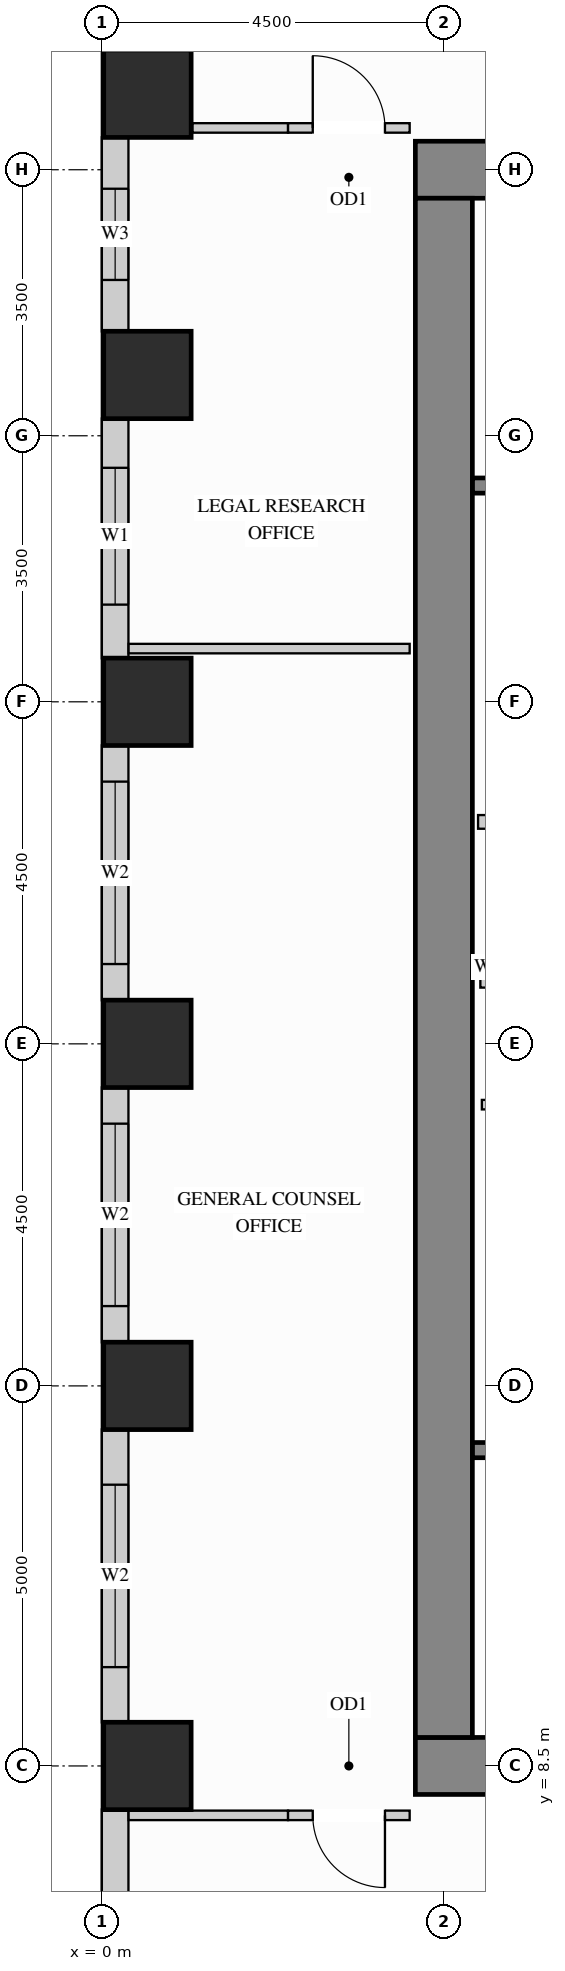
"""IFC4 building model, lengths in metres.
Left out: names, types, materials, properties, quantities, classifications, styles, units other than length and angle.
Written with IfcOpenShell. Run it as: python <this file> out.ifc"""

import sys

from ifc_helpers import new_model, si_unit, direction, frame, frame_2d, origin, origin_2d, place, context, subcontext, project, spatial, rectangle, extrude, source, transform, mapped, element, fill, save


model = new_model("IFC4")
c1 = context("Model", 3, precision=1e-05, world=origin(), true_north=direction((0.0, 1.0)))
c2 = subcontext(c1, "Body", "Model", "MODEL_VIEW")
j1 = project(units=[si_unit("LENGTHUNIT", "METRE"), si_unit("PLANEANGLEUNIT", "RADIAN")], contexts=[c1])
p1 = place(None, origin())
s1 = spatial("IfcSite", under=j1, at=p1, CompositionType="ELEMENT")
p2 = place(p1, origin())
s2 = spatial("IfcBuilding", under=s1, at=p2, CompositionType="ELEMENT")
p3 = place(p2, frame((0.0, 0.0, 88.2)))
s3 = spatial("IfcBuildingStorey", under=s2, at=p3, CompositionType="ELEMENT", Elevation=88.2)
m1 = source(origin(), c2, "Body", "SweptSolid", [
    extrude(rectangle(XDim=1.15, YDim=1.15, at=origin_2d()), origin(), (0.0, 0.0, 1.0), 3.38),
])
for number, where, z_axis, x_axis in (
    (1, (0.6, 13.5, 0.0), (0.0, 0.0, 1.0), (1.0, 0.0, 0.0)),
    (2, (0.6, 18.0, 0.0), (0.0, 0.0, 1.0), (1.0, 0.0, 0.0)),
    (3, (0.6, 22.5, 0.0), (0.0, 0.0, 1.0), (1.0, 0.0, 0.0)),
    (4, (0.6, 26.8, 0.0), (0.0, 0.0, 1.0), (1.0, 0.0, 0.0)),
    (5, (0.6, 30.5, 0.0), (0.0, 0.0, 1.0), (1.0, 0.0, 0.0)),
    (6, (0.6, 8.5, 0.0), (0.0, 0.0, 1.0), (1.0, 0.0, 0.0)),
):
    element("IfcColumn", number, at=place(p3, frame(where, z_axis=z_axis, x_axis=x_axis)), inside=s3, PredefinedType="COLUMN", context=c2, shape_type="MappedRepresentation", body=[
        mapped(m1, transform((0.0, 0.0, 0.0), x_axis=(1.0, 0.0, 0.0), y_axis=(0.0, 1.0, 0.0), z_axis=(0.0, 0.0, 1.0))),
    ])
m2 = source(origin(), c2, "Body", "SweptSolid", [
    extrude(rectangle(XDim=10.75, YDim=0.75, at=frame_2d((5.375, 0.0))), origin(), (0.0, 0.0, 1.0), 3.38),
])
for number, where, z_axis, x_axis in (
    (7, (4.125, 29.5, 0.0), (0.0, 0.0, 1.0), (1.0, 0.0, 0.0)),
    (8, (4.125, 8.5, 0.0), (0.0, 0.0, 1.0), (1.0, 0.0, 0.0)),
):
    element("IfcWall", number, at=place(p3, frame(where, z_axis=z_axis, x_axis=x_axis)), inside=s3, PredefinedType="SHEAR", context=c2, shape_type="MappedRepresentation", body=[
        mapped(m2, transform((0.0, 0.0, 0.0), x_axis=(1.0, 0.0, 0.0), y_axis=(0.0, 1.0, 0.0), z_axis=(0.0, 0.0, 1.0))),
    ])
m3 = source(origin(), c2, "Body", "SweptSolid", [
    extrude(rectangle(XDim=20.25, YDim=0.75, at=frame_2d((10.125, 0.0))), origin(), (0.0, 0.0, 1.0), 3.38),
])
p4 = place(p3, frame((4.5, 8.875, 0.0), z_axis=(0.0, 0.0, 1.0), x_axis=(0.0, 1.0, 0.0)))
e9 = element("IfcWall", 9, at=p4, inside=s3, PredefinedType="SHEAR", context=c2, shape_type="MappedRepresentation", body=[
    mapped(m3, transform((0.0, 0.0, 0.0), x_axis=(1.0, 0.0, 0.0), y_axis=(0.0, 1.0, 0.0), z_axis=(0.0, 0.0, 1.0))),
])
p5 = place(p3, frame((0.175, 29.927, 0.0), z_axis=(0.0, 0.0, 1.0), x_axis=(0.0, -1.0, 0.0)))
e10 = element("IfcWall", 10, at=p5, inside=s3, PredefinedType="SOLIDWALL", context=c2, shape_type="SweptSolid", body=[
    extrude(rectangle(XDim=2.554, YDim=0.35, at=frame_2d((1.277, 0.0))), origin(), (0.0, 0.0, 1.0), 3.365),
])
p6 = place(p5, frame((0.677, 0.0, 0.78)))
e11 = element("IfcOpeningElement", 11, at=p6, cuts=e10, PredefinedType="OPENING", context=c2, shape_type="SweptSolid", body=[
    extrude(rectangle(XDim=1.2, YDim=2.1, at=frame_2d((0.6, 1.05))), frame((0.0, 0.185, 0.0), z_axis=(0.0, -1.0, 0.0), x_axis=(1.0, 0.0, 0.0)), (0.0, 0.0, 1.0), 0.37),
])
p7 = place(p3, frame((0.175, 26.227, 0.0), z_axis=(0.0, 0.0, 1.0), x_axis=(0.0, -1.0, 0.0)))
e12 = element("IfcWall", 12, at=p7, inside=s3, PredefinedType="SOLIDWALL", context=c2, shape_type="SweptSolid", body=[
    extrude(rectangle(XDim=3.154, YDim=0.35, at=frame_2d((1.577, 0.0))), origin(), (0.0, 0.0, 1.0), 3.365),
])
p8 = place(p7, frame((0.648, 0.0, 0.78)))
e13 = element("IfcOpeningElement", 13, at=p8, cuts=e12, PredefinedType="OPENING", context=c2, shape_type="SweptSolid", body=[
    extrude(rectangle(XDim=1.8, YDim=2.1, at=frame_2d((0.9, 1.05))), frame((0.0, 0.185, 0.0), z_axis=(0.0, -1.0, 0.0), x_axis=(1.0, 0.0, 0.0)), (0.0, 0.0, 1.0), 0.37),
])
p9 = place(p3, frame((0.175, 21.927, 0.0), z_axis=(0.0, 0.0, 1.0), x_axis=(0.0, -1.0, 0.0)))
e14 = element("IfcWall", 14, at=p9, inside=s3, PredefinedType="SOLIDWALL", context=c2, shape_type="SweptSolid", body=[
    extrude(rectangle(XDim=3.354, YDim=0.35, at=frame_2d((1.677, 0.0))), origin(), (0.0, 0.0, 1.0), 3.365),
])
p10 = place(p9, frame((0.477, 0.0, 0.78)))
e15 = element("IfcOpeningElement", 15, at=p10, cuts=e14, PredefinedType="OPENING", context=c2, shape_type="SweptSolid", body=[
    extrude(rectangle(XDim=2.4, YDim=2.1, at=frame_2d((1.2, 1.05))), frame((0.0, 0.185, 0.0), z_axis=(0.0, -1.0, 0.0), x_axis=(1.0, 0.0, 0.0)), (0.0, 0.0, 1.0), 0.37),
])
p11 = place(p3, frame((0.175, 17.427, 0.0), z_axis=(0.0, 0.0, 1.0), x_axis=(0.0, -1.0, 0.0)))
e16 = element("IfcWall", 16, at=p11, inside=s3, PredefinedType="SOLIDWALL", context=c2, shape_type="SweptSolid", body=[
    extrude(rectangle(XDim=3.354, YDim=0.35, at=frame_2d((1.677, 0.0))), origin(), (0.0, 0.0, 1.0), 3.365),
])
p12 = place(p11, frame((0.477, 0.0, 0.78)))
e17 = element("IfcOpeningElement", 17, at=p12, cuts=e16, PredefinedType="OPENING", context=c2, shape_type="SweptSolid", body=[
    extrude(rectangle(XDim=2.4, YDim=2.1, at=frame_2d((1.2, 1.05))), frame((0.0, 0.185, 0.0), z_axis=(0.0, -1.0, 0.0), x_axis=(1.0, 0.0, 0.0)), (0.0, 0.0, 1.0), 0.37),
])
p13 = place(p3, frame((0.175, 12.927, 0.0), z_axis=(0.0, 0.0, 1.0), x_axis=(0.0, -1.0, 0.0)))
e18 = element("IfcWall", 18, at=p13, inside=s3, PredefinedType="SOLIDWALL", context=c2, shape_type="SweptSolid", body=[
    extrude(rectangle(XDim=3.854, YDim=0.35, at=frame_2d((1.927, 0.0))), origin(), (0.0, 0.0, 1.0), 3.365),
])
p14 = place(p13, frame((0.727, 0.0, 0.78)))
e19 = element("IfcOpeningElement", 19, at=p14, cuts=e18, PredefinedType="OPENING", context=c2, shape_type="SweptSolid", body=[
    extrude(rectangle(XDim=2.4, YDim=2.1, at=frame_2d((1.2, 1.05))), frame((0.0, 0.185, 0.0), z_axis=(0.0, -1.0, 0.0), x_axis=(1.0, 0.0, 0.0)), (0.0, 0.0, 1.0), 0.37),
])
p15 = place(p3, frame((0.175, 7.927, 0.0), z_axis=(0.0, 0.0, 1.0), x_axis=(0.0, -1.0, 0.0)))
e20 = element("IfcWall", 20, at=p15, inside=s3, PredefinedType="SOLIDWALL", context=c2, shape_type="SweptSolid", body=[
    extrude(rectangle(XDim=3.854, YDim=0.35, at=frame_2d((1.927, 0.0))), origin(), (0.0, 0.0, 1.0), 3.365),
])
p16 = place(p15, frame((2.206, 0.0, 0.78)))
e21 = element("IfcOpeningElement", 21, at=p16, cuts=e20, PredefinedType="OPENING", context=c2, shape_type="SweptSolid", body=[
    extrude(rectangle(XDim=1.2, YDim=2.1, at=frame_2d((0.6, 1.05))), frame((0.0, 0.185, 0.0), z_axis=(0.0, -1.0, 0.0), x_axis=(1.0, 0.0, 0.0)), (0.0, 0.0, 1.0), 0.37),
])
m4 = source(origin(), c2, "Body", "SweptSolid", [
    extrude(rectangle(XDim=2.2, YDim=0.18, at=frame_2d((1.1, 0.0))), origin(), (0.0, 0.0, 1.0), 3.365),
])
p17 = place(p3, frame((4.95, 20.92, 0.0), z_axis=(0.0, 0.0, 1.0), x_axis=(1.0, 0.0, 0.0)))
e22 = element("IfcWall", 22, at=p17, inside=s3, PredefinedType="PARTITIONING", context=c2, shape_type="MappedRepresentation", body=[
    mapped(m4, transform((0.0, 0.0, 0.0), x_axis=(1.0, 0.0, 0.0), y_axis=(0.0, 1.0, 0.0), z_axis=(0.0, 0.0, 1.0))),
])
p18 = place(p3, frame((5.0, 17.2, 0.0), z_axis=(0.0, 0.0, 1.0), x_axis=(1.0, 0.0, 0.0)))
e23 = element("IfcWall", 23, at=p18, inside=s3, PredefinedType="PARTITIONING", context=c2, shape_type="SweptSolid", body=[
    extrude(rectangle(XDim=2.4, YDim=0.125, at=frame_2d((1.2, 0.0))), origin(), (0.0, 0.0, 1.0), 3.365),
])
p19 = place(p18, frame((0.7, 0.0, 0.0)))
e24 = element("IfcOpeningElement", 24, at=p19, cuts=e23, PredefinedType="OPENING", context=c2, shape_type="SweptSolid", body=[
    extrude(rectangle(XDim=0.85, YDim=2.1, at=frame_2d((0.425, 1.05))), frame((0.0, 0.073, 0.0), z_axis=(0.0, -1.0, 0.0), x_axis=(1.0, 0.0, 0.0)), (0.0, 0.0, 1.0), 0.145),
])
m5 = source(origin(), c2, "Body", "SweptSolid", [
    extrude(rectangle(XDim=1.26, YDim=0.125, at=frame_2d((0.63, 0.0))), origin(), (0.0, 0.0, 1.0), 3.365),
])
p20 = place(p3, frame((1.19, 30.05, 0.0), z_axis=(0.0, 0.0, 1.0), x_axis=(1.0, 0.0, 0.0)))
e25 = element("IfcWall", 25, at=p20, inside=s3, PredefinedType="PARTITIONING", context=c2, shape_type="MappedRepresentation", body=[
    mapped(m5, transform((0.0, 0.0, 0.0), x_axis=(1.0, 0.0, 0.0), y_axis=(0.0, 1.0, 0.0), z_axis=(0.0, 0.0, 1.0))),
])
p21 = place(p3, frame((2.45, 30.05, 0.0), z_axis=(0.0, 0.0, 1.0), x_axis=(1.0, 0.0, 0.0)))
e26 = element("IfcWall", 26, at=p21, inside=s3, PredefinedType="PARTITIONING", context=c2, shape_type="SweptSolid", body=[
    extrude(rectangle(XDim=1.6, YDim=0.125, at=frame_2d((0.8, 0.0))), origin(), (0.0, 0.0, 1.0), 3.365),
])
p22 = place(p21, frame((0.325, 0.0, 0.0)))
e27 = element("IfcOpeningElement", 27, at=p22, cuts=e26, PredefinedType="OPENING", context=c2, shape_type="SweptSolid", body=[
    extrude(rectangle(XDim=0.95, YDim=2.15, at=frame_2d((0.475, 1.075))), frame((0.0, 0.073, 0.0), z_axis=(0.0, -1.0, 0.0), x_axis=(1.0, 0.0, 0.0)), (0.0, 0.0, 1.0), 0.145),
])
m6 = source(origin(), c2, "Body", "SweptSolid", [
    extrude(rectangle(XDim=2.098, YDim=0.125, at=frame_2d((1.049, 0.0))), origin(), (0.0, 0.0, 1.0), 3.365),
])
p23 = place(p3, frame((0.352, 7.85, 0.0), z_axis=(0.0, 0.0, 1.0), x_axis=(1.0, 0.0, 0.0)))
e28 = element("IfcWall", 28, at=p23, inside=s3, PredefinedType="PARTITIONING", context=c2, shape_type="MappedRepresentation", body=[
    mapped(m6, transform((0.0, 0.0, 0.0), x_axis=(1.0, 0.0, 0.0), y_axis=(0.0, 1.0, 0.0), z_axis=(0.0, 0.0, 1.0))),
])
p24 = place(p3, frame((2.45, 7.85, 0.0), z_axis=(0.0, 0.0, 1.0), x_axis=(1.0, 0.0, 0.0)))
e29 = element("IfcWall", 29, at=p24, inside=s3, PredefinedType="PARTITIONING", context=c2, shape_type="SweptSolid", body=[
    extrude(rectangle(XDim=1.6, YDim=0.125, at=frame_2d((0.8, 0.0))), origin(), (0.0, 0.0, 1.0), 3.365),
])
p25 = place(p24, frame((0.325, 0.0, 0.0)))
e30 = element("IfcOpeningElement", 30, at=p25, cuts=e29, PredefinedType="OPENING", context=c2, shape_type="SweptSolid", body=[
    extrude(rectangle(XDim=0.95, YDim=2.15, at=frame_2d((0.475, 1.075))), frame((0.0, 0.073, 0.0), z_axis=(0.0, -1.0, 0.0), x_axis=(1.0, 0.0, 0.0)), (0.0, 0.0, 1.0), 0.145),
])
m7 = source(origin(), c2, "Body", "SweptSolid", [
    extrude(rectangle(XDim=3.698, YDim=0.125, at=frame_2d((1.849, 0.0))), origin(), (0.0, 0.0, 1.0), 3.365),
])
p26 = place(p3, frame((0.352, 23.2, 0.0), z_axis=(0.0, 0.0, 1.0), x_axis=(1.0, 0.0, 0.0)))
e31 = element("IfcWall", 31, at=p26, inside=s3, PredefinedType="PARTITIONING", context=c2, shape_type="MappedRepresentation", body=[
    mapped(m7, transform((0.0, 0.0, 0.0), x_axis=(1.0, 0.0, 0.0), y_axis=(0.0, 1.0, 0.0), z_axis=(0.0, 0.0, 1.0))),
])
m8 = source(origin(), c2, "Body", "SweptSolid", [
    extrude(rectangle(XDim=2.09, YDim=0.2, at=frame_2d((1.045, 0.0))), origin(), (0.0, 0.0, 1.0), 3.365),
])
p27 = place(p3, frame((4.98, 18.84, 0.0), z_axis=(0.0, 0.0, 1.0), x_axis=(1.0, 0.0, 0.0)))
e32 = element("IfcWall", 32, at=p27, inside=s3, PredefinedType="PARTITIONING", context=c2, shape_type="MappedRepresentation", body=[
    mapped(m8, transform((0.0, 0.0, 0.0), x_axis=(1.0, 0.0, 0.0), y_axis=(0.0, 1.0, 0.0), z_axis=(0.0, 0.0, 1.0))),
])
p28 = place(p3, frame((4.877, 12.655, 0.0), z_axis=(0.0, 0.0, 1.0), x_axis=(1.0, 0.0, 0.0)))
e33 = element("IfcWall", 33, at=p28, inside=s3, PredefinedType="SHEAR", context=c2, shape_type="SweptSolid", body=[
    extrude(rectangle(XDim=7.528, YDim=0.2, at=frame_2d((3.764, 0.0))), origin(), (0.0, 0.0, 1.0), 3.38),
])
p29 = place(p28, frame((0.4, 0.0, 0.0)))
e34 = element("IfcOpeningElement", 34, at=p29, cuts=e33, PredefinedType="OPENING", context=c2, shape_type="SweptSolid", body=[
    extrude(rectangle(XDim=1.1, YDim=2.15, at=frame_2d((0.55, 1.075))), frame((0.0, 0.11, 0.0), z_axis=(0.0, -1.0, 0.0), x_axis=(1.0, 0.0, 0.0)), (0.0, 0.0, 1.0), 0.22),
])
p30 = place(p3, frame((4.877, 25.345, 0.0), z_axis=(0.0, 0.0, 1.0), x_axis=(1.0, 0.0, 0.0)))
e35 = element("IfcWall", 35, at=p30, inside=s3, PredefinedType="SHEAR", context=c2, shape_type="SweptSolid", body=[
    extrude(rectangle(XDim=7.528, YDim=0.2, at=frame_2d((3.764, 0.0))), origin(), (0.0, 0.0, 1.0), 3.38),
])
p31 = place(p30, frame((0.4, 0.0, 0.0)))
e36 = element("IfcOpeningElement", 36, at=p31, cuts=e35, PredefinedType="OPENING", context=c2, shape_type="SweptSolid", body=[
    extrude(rectangle(XDim=1.1, YDim=2.15, at=frame_2d((0.55, 1.075))), frame((0.0, 0.11, 0.0), z_axis=(0.0, -1.0, 0.0), x_axis=(1.0, 0.0, 0.0)), (0.0, 0.0, 1.0), 0.22),
])
m9 = source(origin(), c2, "Body", "SweptSolid", [
    extrude(rectangle(XDim=0.95, YDim=2.15, at=frame_2d((0.475, 1.075))), frame((0.0, 0.025, 0.0), z_axis=(0.0, -1.0, 0.0), x_axis=(1.0, 0.0, 0.0)), (0.0, 0.0, 1.0), 0.05),
])
p32 = place(p25, origin())
e37 = element("IfcDoor", 37, at=p32, inside=s3, OperationType="SINGLE_SWING_RIGHT", PredefinedType="DOOR", context=c2, shape_type="MappedRepresentation", body=[
    mapped(m9, transform((0.0, 0.0, 0.0), x_axis=(1.0, 0.0, 0.0), y_axis=(0.0, 1.0, 0.0), z_axis=(0.0, 0.0, 1.0))),
])
fill(e30, e37)
p33 = place(p22, origin())
e38 = element("IfcDoor", 38, at=p33, inside=s3, OperationType="SINGLE_SWING_LEFT", PredefinedType="DOOR", context=c2, shape_type="MappedRepresentation", body=[
    mapped(m9, transform((0.0, 0.0, 0.0), x_axis=(1.0, 0.0, 0.0), y_axis=(0.0, 1.0, 0.0), z_axis=(0.0, 0.0, 1.0))),
])
fill(e27, e38)
m10 = source(origin(), c2, "Body", "SweptSolid", [
    extrude(rectangle(XDim=1.8, YDim=2.1, at=frame_2d((0.9, 1.05))), frame((0.0, 0.03, 0.0), z_axis=(0.0, -1.0, 0.0), x_axis=(1.0, 0.0, 0.0)), (0.0, 0.0, 1.0), 0.06),
])
p34 = place(p8, origin())
e39 = element("IfcWindow", 39, at=p34, inside=s3, PartitioningType="SINGLE_PANEL", PredefinedType="WINDOW", context=c2, shape_type="MappedRepresentation", body=[
    mapped(m10, transform((0.0, 0.0, 0.0), x_axis=(1.0, 0.0, 0.0), y_axis=(0.0, 1.0, 0.0), z_axis=(0.0, 0.0, 1.0))),
])
fill(e13, e39)
m11 = source(origin(), c2, "Body", "SweptSolid", [
    extrude(rectangle(XDim=2.4, YDim=2.1, at=frame_2d((1.2, 1.05))), frame((0.0, 0.03, 0.0), z_axis=(0.0, -1.0, 0.0), x_axis=(1.0, 0.0, 0.0)), (0.0, 0.0, 1.0), 0.06),
])
p35 = place(p10, origin())
e40 = element("IfcWindow", 40, at=p35, inside=s3, PartitioningType="SINGLE_PANEL", PredefinedType="WINDOW", context=c2, shape_type="MappedRepresentation", body=[
    mapped(m11, transform((0.0, 0.0, 0.0), x_axis=(1.0, 0.0, 0.0), y_axis=(0.0, 1.0, 0.0), z_axis=(0.0, 0.0, 1.0))),
])
fill(e15, e40)
p36 = place(p12, origin())
e41 = element("IfcWindow", 41, at=p36, inside=s3, PartitioningType="SINGLE_PANEL", PredefinedType="WINDOW", context=c2, shape_type="MappedRepresentation", body=[
    mapped(m11, transform((0.0, 0.0, 0.0), x_axis=(1.0, 0.0, 0.0), y_axis=(0.0, 1.0, 0.0), z_axis=(0.0, 0.0, 1.0))),
])
fill(e17, e41)
p37 = place(p14, origin())
e42 = element("IfcWindow", 42, at=p37, inside=s3, PartitioningType="SINGLE_PANEL", PredefinedType="WINDOW", context=c2, shape_type="MappedRepresentation", body=[
    mapped(m11, transform((0.0, 0.0, 0.0), x_axis=(1.0, 0.0, 0.0), y_axis=(0.0, 1.0, 0.0), z_axis=(0.0, 0.0, 1.0))),
])
fill(e19, e42)
m12 = source(origin(), c2, "Body", "SweptSolid", [
    extrude(rectangle(XDim=1.2, YDim=2.1, at=frame_2d((0.6, 1.05))), frame((0.0, 0.03, 0.0), z_axis=(0.0, -1.0, 0.0), x_axis=(1.0, 0.0, 0.0)), (0.0, 0.0, 1.0), 0.06),
])
p38 = place(p6, origin())
e43 = element("IfcWindow", 43, at=p38, inside=s3, PartitioningType="SINGLE_PANEL", PredefinedType="WINDOW", context=c2, shape_type="MappedRepresentation", body=[
    mapped(m12, transform((0.0, 0.0, 0.0), x_axis=(1.0, 0.0, 0.0), y_axis=(0.0, 1.0, 0.0), z_axis=(0.0, 0.0, 1.0))),
])
fill(e11, e43)
save(model, sys.argv[1])
